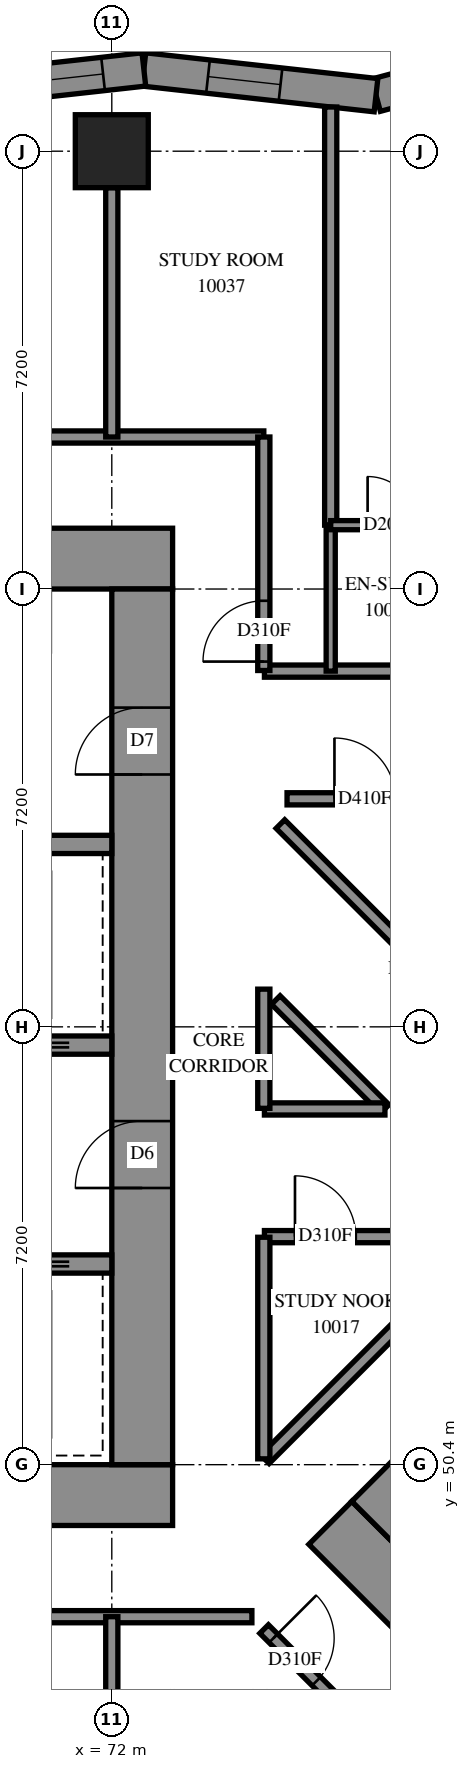
"""IFC4 building model, lengths in metres.
Left out: names, types, materials, properties, quantities, classifications, styles, units other than length and angle.
Written with IfcOpenShell. Run it as: python <this file> out.ifc"""

import sys

from ifc_helpers import new_model, si_unit, direction, frame, frame_2d, origin, origin_2d, place, context, subcontext, project, spatial, polyline, rectangle, outline, extrude, element, fill, save


model = new_model("IFC4")
c1 = context("Model", 3, precision=1e-05, world=origin(), true_north=direction((0.0, 1.0)))
c2 = subcontext(c1, "Body", "Model", "MODEL_VIEW")
j1 = project(units=[si_unit("LENGTHUNIT", "METRE"), si_unit("PLANEANGLEUNIT", "RADIAN")], contexts=[c1])
p1 = place(None, origin())
s1 = spatial("IfcSite", under=j1, at=p1, CompositionType="ELEMENT")
p2 = place(p1, origin())
s2 = spatial("IfcBuilding", under=s1, at=p2, CompositionType="ELEMENT")
p3 = place(p2, frame((0.0, 0.0, 40.6)))
s3 = spatial("IfcBuildingStorey", under=s2, at=p3, CompositionType="ELEMENT", Elevation=40.6)
p4 = place(p3, frame((72.0, 72.0, 0.0), z_axis=(0.0, 0.0, 1.0), x_axis=(1.0, 0.0, 0.0)))
e1 = element("IfcColumn", 1, at=p4, inside=s3, PredefinedType="COLUMN", context=c2, shape_type="SweptSolid", body=[
    extrude(rectangle(XDim=1.2, YDim=1.2, at=origin_2d()), origin(), (0.0, 0.0, 1.0), 3.1),
])
p5 = place(p3, frame((56.6, 49.9, -0.3), z_axis=(0.0, 0.0, 1.0), x_axis=(1.0, 0.0, 0.0)))
e2 = element("IfcWall", 2, at=p5, inside=s3, PredefinedType="SHEAR", context=c2, shape_type="SweptSolid", body=[
    extrude(rectangle(XDim=16.4, YDim=1.0, at=frame_2d((8.2, 0.0))), origin(), (0.0, 0.0, 1.0), 2.7),
])
p6 = place(p3, frame((56.6, 65.3, -0.3), z_axis=(0.0, 0.0, 1.0), x_axis=(1.0, 0.0, 0.0)))
e3 = element("IfcWall", 3, at=p6, inside=s3, PredefinedType="SHEAR", context=c2, shape_type="SweptSolid", body=[
    extrude(rectangle(XDim=16.4, YDim=1.0, at=frame_2d((8.2, 0.0))), origin(), (0.0, 0.0, 1.0), 2.7),
])
p7 = place(p6, frame((11.0, 0.0, 0.3)))
e4 = element("IfcOpeningElement", 4, at=p7, cuts=e3, PredefinedType="OPENING", context=c2, shape_type="SweptSolid", body=[
    extrude(rectangle(XDim=0.8, YDim=2.1, at=frame_2d((0.4, 1.05))), frame((0.0, 0.51, 0.0), z_axis=(0.0, -1.0, 0.0), x_axis=(1.0, 0.0, 0.0)), (0.0, 0.0, 1.0), 1.02),
])
p8 = place(p3, frame((72.5, 50.4, -0.3), z_axis=(0.0, 0.0, 1.0), x_axis=(0.0, 1.0, 0.0)))
e5 = element("IfcWall", 5, at=p8, inside=s3, PredefinedType="SHEAR", context=c2, shape_type="SweptSolid", body=[
    extrude(rectangle(XDim=14.4, YDim=1.0, at=frame_2d((7.2, 0.0))), origin(), (0.0, 0.0, 1.0), 2.7),
])
p9 = place(p8, frame((4.55, 0.0, 0.3)))
e6 = element("IfcOpeningElement", 6, at=p9, cuts=e5, PredefinedType="OPENING", context=c2, shape_type="SweptSolid", body=[
    extrude(rectangle(XDim=1.1, YDim=2.1, at=frame_2d((0.55, 1.05))), frame((0.0, 0.51, 0.0), z_axis=(0.0, -1.0, 0.0), x_axis=(1.0, 0.0, 0.0)), (0.0, 0.0, 1.0), 1.02),
])
p10 = place(p8, frame((11.35, 0.0, 0.3)))
e7 = element("IfcOpeningElement", 7, at=p10, cuts=e5, PredefinedType="OPENING", context=c2, shape_type="SweptSolid", body=[
    extrude(rectangle(XDim=1.1, YDim=2.1, at=frame_2d((0.55, 1.05))), frame((0.0, 0.51, 0.0), z_axis=(0.0, -1.0, 0.0), x_axis=(1.0, 0.0, 0.0)), (0.0, 0.0, 1.0), 1.02),
])
p11 = place(p3, frame((57.6, 53.7, 0.0), z_axis=(0.0, 0.0, 1.0), x_axis=(1.0, 0.0, 0.0)))
e8 = element("IfcWall", 8, at=p11, inside=s3, PredefinedType="SOLIDWALL", context=c2, shape_type="SweptSolid", body=[
    extrude(rectangle(XDim=14.4, YDim=0.3, at=frame_2d((7.2, 0.0))), origin(), (0.0, 0.0, 1.0), 3.1),
])
p12 = place(p11, frame((1.25, 0.0, 0.0)))
e9 = element("IfcOpeningElement", 9, at=p12, cuts=e8, PredefinedType="OPENING", context=c2, shape_type="SweptSolid", body=[
    extrude(rectangle(XDim=1.1, YDim=2.1, at=frame_2d((0.55, 1.05))), frame((0.0, 0.16, 0.0), z_axis=(0.0, -1.0, 0.0), x_axis=(1.0, 0.0, 0.0)), (0.0, 0.0, 1.0), 0.32),
])
p13 = place(p11, frame((4.85, 0.0, 0.0)))
e10 = element("IfcOpeningElement", 10, at=p13, cuts=e8, PredefinedType="OPENING", context=c2, shape_type="SweptSolid", body=[
    extrude(rectangle(XDim=1.1, YDim=2.1, at=frame_2d((0.55, 1.05))), frame((0.0, 0.16, 0.0), z_axis=(0.0, -1.0, 0.0), x_axis=(1.0, 0.0, 0.0)), (0.0, 0.0, 1.0), 0.32),
])
p14 = place(p11, frame((8.45, 0.0, 0.0)))
e11 = element("IfcOpeningElement", 11, at=p14, cuts=e8, PredefinedType="OPENING", context=c2, shape_type="SweptSolid", body=[
    extrude(rectangle(XDim=1.1, YDim=2.1, at=frame_2d((0.55, 1.05))), frame((0.0, 0.16, 0.0), z_axis=(0.0, -1.0, 0.0), x_axis=(1.0, 0.0, 0.0)), (0.0, 0.0, 1.0), 0.32),
])
p15 = place(p11, frame((12.05, 0.0, 0.0)))
e12 = element("IfcOpeningElement", 12, at=p15, cuts=e8, PredefinedType="OPENING", context=c2, shape_type="SweptSolid", body=[
    extrude(rectangle(XDim=1.1, YDim=2.1, at=frame_2d((0.55, 1.05))), frame((0.0, 0.16, 0.0), z_axis=(0.0, -1.0, 0.0), x_axis=(1.0, 0.0, 0.0)), (0.0, 0.0, 1.0), 0.32),
])
p16 = place(p3, frame((57.6, 57.3, 0.0), z_axis=(0.0, 0.0, 1.0), x_axis=(1.0, 0.0, 0.0)))
e13 = element("IfcWall", 13, at=p16, inside=s3, PredefinedType="SOLIDWALL", context=c2, shape_type="SweptSolid", body=[
    extrude(rectangle(XDim=14.4, YDim=0.3, at=frame_2d((7.2, 0.0))), origin(), (0.0, 0.0, 1.0), 3.1),
])
p17 = place(p16, frame((12.05, 0.0, 0.0)))
e14 = element("IfcOpeningElement", 14, at=p17, cuts=e13, PredefinedType="OPENING", context=c2, shape_type="SweptSolid", body=[
    extrude(rectangle(XDim=1.1, YDim=2.1, at=frame_2d((0.55, 1.05))), frame((0.0, 0.16, 0.0), z_axis=(0.0, -1.0, 0.0), x_axis=(1.0, 0.0, 0.0)), (0.0, 0.0, 1.0), 0.32),
])
p18 = place(p3, frame((64.8, 60.6, 0.0), z_axis=(0.0, 0.0, 1.0), x_axis=(1.0, 0.0, 0.0)))
e15 = element("IfcWall", 15, at=p18, inside=s3, PredefinedType="SOLIDWALL", context=c2, shape_type="SweptSolid", body=[
    extrude(rectangle(XDim=7.2, YDim=0.3, at=frame_2d((3.6, 0.0))), origin(), (0.0, 0.0, 1.0), 3.1),
])
p19 = place(p3, frame((75.594, 49.443, -0.3), z_axis=(0.0, 0.0, 1.0), x_axis=(0.7071037324, -0.70710983, 0.0)))
e16 = element("IfcWall", 16, at=p19, inside=s3, PredefinedType="SHEAR", context=c2, shape_type="SweptSolid", body=[
    extrude(rectangle(XDim=16.4, YDim=1.0, at=frame_2d((8.2, 0.0))), origin(), (0.0, 0.0, 1.0), 2.7),
])
p20 = place(p3, frame((76.301, 49.443, -0.3), z_axis=(0.0, 0.0, 1.0), x_axis=(0.7071067812, 0.7071067812, 0.0)))
e17 = element("IfcWall", 17, at=p20, inside=s3, PredefinedType="SHEAR", context=c2, shape_type="SweptSolid", body=[
    extrude(rectangle(XDim=14.4, YDim=1.0, at=frame_2d((7.2, 0.0))), origin(), (0.0, 0.0, 1.0), 2.7),
])
p21 = place(p20, frame((4.55, 0.0, 0.3)))
e18 = element("IfcOpeningElement", 18, at=p21, cuts=e17, PredefinedType="OPENING", context=c2, shape_type="SweptSolid", body=[
    extrude(rectangle(XDim=1.1, YDim=2.1, at=frame_2d((0.55, 1.05))), frame((0.0, 0.51, 0.0), z_axis=(0.0, -1.0, 0.0), x_axis=(1.0, 0.0, 0.0)), (0.0, 0.0, 1.0), 1.02),
])
p22 = place(p20, frame((11.35, 0.0, 0.3)))
e19 = element("IfcOpeningElement", 19, at=p22, cuts=e17, PredefinedType="OPENING", context=c2, shape_type="SweptSolid", body=[
    extrude(rectangle(XDim=1.1, YDim=2.1, at=frame_2d((0.55, 1.05))), frame((0.0, 0.51, 0.0), z_axis=(0.0, -1.0, 0.0), x_axis=(1.0, 0.0, 0.0)), (0.0, 0.0, 1.0), 1.02),
])
p23 = place(p3, frame((79.982, 73.899, 0.0), z_axis=(0.0, 0.0, 1.0), x_axis=(-0.9656880232, -0.259704913, 0.0)))
e20 = element("IfcWall", 20, at=p23, inside=s3, PredefinedType="SOLIDWALL", context=c2, shape_type="SweptSolid", body=[
    extrude(outline(polyline([(-0.217, -0.275), (3.714, -0.275), (3.818, 0.275), (0.217, 0.275), (-0.217, -0.275)])), origin(), (0.0, 0.0, 1.0), 3.1),
])
p24 = place(p23, frame((1.588, 0.0, 0.5)))
e21 = element("IfcOpeningElement", 21, at=p24, cuts=e20, PredefinedType="OPENING", context=c2, shape_type="SweptSolid", body=[
    extrude(rectangle(XDim=1.2, YDim=2.45, at=frame_2d((0.6, 1.225))), frame((0.0, 0.285, 0.0), z_axis=(0.0, -1.0, 0.0), x_axis=(1.0, 0.0, 0.0)), (0.0, 0.0, 1.0), 0.57),
])
p25 = place(p3, frame((76.345, 72.921, 0.0), z_axis=(0.0, 0.0, 1.0), x_axis=(-0.9939087915, 0.1102057815, 0.0)))
e22 = element("IfcWall", 22, at=p25, inside=s3, PredefinedType="SOLIDWALL", context=c2, shape_type="SweptSolid", body=[
    extrude(outline(polyline([(0.052, -0.275), (3.872, -0.275), (3.811, 0.275), (-0.052, 0.275), (0.052, -0.275)])), origin(), (0.0, 0.0, 1.0), 3.1),
])
p26 = place(p25, frame((1.58, 0.0, 0.5)))
e23 = element("IfcOpeningElement", 23, at=p26, cuts=e22, PredefinedType="OPENING", context=c2, shape_type="SweptSolid", body=[
    extrude(rectangle(XDim=1.2, YDim=2.45, at=frame_2d((0.6, 1.225))), frame((0.0, 0.285, 0.0), z_axis=(0.0, -1.0, 0.0), x_axis=(1.0, 0.0, 0.0)), (0.0, 0.0, 1.0), 0.57),
])
p27 = place(p3, frame((72.527, 73.344, 0.0), z_axis=(0.0, 0.0, 1.0), x_axis=(-0.99390702, -0.1102217568, 0.0)))
e24 = element("IfcWall", 24, at=p27, inside=s3, PredefinedType="SOLIDWALL", context=c2, shape_type="SweptSolid", body=[
    extrude(outline(polyline([(-0.03, -0.275), (3.789, -0.275), (3.85, 0.275), (0.03, 0.275), (-0.03, -0.275)])), origin(), (0.0, 0.0, 1.0), 3.1),
])
p28 = place(p27, frame((0.675, 0.0, 0.5)))
e25 = element("IfcOpeningElement", 25, at=p28, cuts=e24, PredefinedType="OPENING", context=c2, shape_type="SweptSolid", body=[
    extrude(rectangle(XDim=2.8, YDim=2.45, at=frame_2d((1.4, 1.225))), frame((0.0, 0.285, 0.0), z_axis=(0.0, -1.0, 0.0), x_axis=(1.0, 0.0, 0.0)), (0.0, 0.0, 1.0), 0.57),
])
p29 = place(p3, frame((55.1, 67.3, 0.0), z_axis=(0.0, 0.0, 1.0), x_axis=(1.0, 0.0, 0.0)))
e26 = element("IfcWall", 26, at=p29, inside=s3, PredefinedType="PARTITIONING", context=c2, shape_type="SweptSolid", body=[
    extrude(rectangle(XDim=19.4, YDim=0.2, at=frame_2d((9.7, 0.0))), origin(), (0.0, 0.0, 1.0), 3.1),
])
p30 = place(p29, frame((6.399, 0.0, 0.0)))
e27 = element("IfcOpeningElement", 27, at=p30, cuts=e26, PredefinedType="OPENING", context=c2, shape_type="SweptSolid", body=[
    extrude(rectangle(XDim=0.9, YDim=2.1, at=frame_2d((0.45, 1.05))), frame((0.0, 0.11, 0.0), z_axis=(0.0, -1.0, 0.0), x_axis=(1.0, 0.0, 0.0)), (0.0, 0.0, 1.0), 0.22),
])
p31 = place(p29, frame((13.599, 0.0, 0.0)))
e28 = element("IfcOpeningElement", 28, at=p31, cuts=e26, PredefinedType="OPENING", context=c2, shape_type="SweptSolid", body=[
    extrude(rectangle(XDim=0.9, YDim=2.1, at=frame_2d((0.45, 1.05))), frame((0.0, 0.11, 0.0), z_axis=(0.0, -1.0, 0.0), x_axis=(1.0, 0.0, 0.0)), (0.0, 0.0, 1.0), 0.22),
])
p32 = place(p3, frame((55.1, 47.9, 0.0), z_axis=(0.0, 0.0, 1.0), x_axis=(1.0, 0.0, 0.0)))
e29 = element("IfcWall", 29, at=p32, inside=s3, PredefinedType="PARTITIONING", context=c2, shape_type="SweptSolid", body=[
    extrude(rectangle(XDim=19.204, YDim=0.2, at=frame_2d((9.602, 0.0))), origin(), (0.0, 0.0, 1.0), 3.1),
])
p33 = place(p32, frame((6.399, 0.0, 0.0)))
e30 = element("IfcOpeningElement", 30, at=p33, cuts=e29, PredefinedType="OPENING", context=c2, shape_type="SweptSolid", body=[
    extrude(rectangle(XDim=0.9, YDim=2.1, at=frame_2d((0.45, 1.05))), frame((0.0, 0.11, 0.0), z_axis=(0.0, -1.0, 0.0), x_axis=(1.0, 0.0, 0.0)), (0.0, 0.0, 1.0), 0.22),
])
p34 = place(p32, frame((13.599, 0.0, 0.0)))
e31 = element("IfcOpeningElement", 31, at=p34, cuts=e29, PredefinedType="OPENING", context=c2, shape_type="SweptSolid", body=[
    extrude(rectangle(XDim=0.9, YDim=2.1, at=frame_2d((0.45, 1.05))), frame((0.0, 0.11, 0.0), z_axis=(0.0, -1.0, 0.0), x_axis=(1.0, 0.0, 0.0)), (0.0, 0.0, 1.0), 0.22),
])
p35 = place(p3, frame((75.6, 65.85, 0.0), z_axis=(0.0, 0.0, 1.0), x_axis=(0.0, 1.0, 0.0)))
e32 = element("IfcWall", 32, at=p35, inside=s3, PredefinedType="PARTITIONING", context=c2, shape_type="SweptSolid", body=[
    extrude(rectangle(XDim=6.877, YDim=0.2, at=frame_2d((3.438, 0.0))), origin(), (0.0, 0.0, 1.0), 3.1),
])
p36 = place(p3, frame((74.773, 60.935, 0.0), z_axis=(0.0, 0.0, 1.0), x_axis=(0.7071067812, -0.7071067812, 0.0)))
e33 = element("IfcWall", 33, at=p36, inside=s3, PredefinedType="PARTITIONING", context=c2, shape_type="SweptSolid", body=[
    extrude(rectangle(XDim=5.408, YDim=0.2, at=frame_2d((2.704, 0.0))), origin(), (0.0, 0.0, 1.0), 3.1),
])
p37 = place(p3, frame((74.517, 50.489, 0.0), z_axis=(0.0, 0.0, 1.0), x_axis=(0.7071067812, 0.7071067812, 0.0)))
e34 = element("IfcWall", 34, at=p37, inside=s3, PredefinedType="PARTITIONING", context=c2, shape_type="SweptSolid", body=[
    extrude(rectangle(XDim=5.176, YDim=0.2, at=frame_2d((2.588, 0.0))), origin(), (0.0, 0.0, 1.0), 3.1),
])
p38 = place(p3, frame((74.51, 63.45, 0.0), z_axis=(0.0, 0.0, 1.0), x_axis=(1.0, 0.0, 0.0)))
e35 = element("IfcWall", 35, at=p38, inside=s3, PredefinedType="PARTITIONING", context=c2, shape_type="SweptSolid", body=[
    extrude(rectangle(XDim=4.69, YDim=0.2, at=frame_2d((2.345, 0.0))), origin(), (0.0, 0.0, 1.0), 3.1),
])
p39 = place(p38, frame((3.12, 0.0, 0.0)))
e36 = element("IfcOpeningElement", 36, at=p39, cuts=e35, PredefinedType="OPENING", context=c2, shape_type="SweptSolid", body=[
    extrude(rectangle(XDim=0.9, YDim=2.1, at=frame_2d((0.45, 1.05))), frame((0.0, 0.11, 0.0), z_axis=(0.0, -1.0, 0.0), x_axis=(1.0, 0.0, 0.0)), (0.0, 0.0, 1.0), 0.22),
])
p40 = place(p3, frame((74.882, 61.35, 0.0), z_axis=(0.0, 0.0, 1.0), x_axis=(1.0, 0.0, 0.0)))
e37 = element("IfcWall", 37, at=p40, inside=s3, PredefinedType="PARTITIONING", context=c2, shape_type="SweptSolid", body=[
    extrude(rectangle(XDim=4.318, YDim=0.2, at=frame_2d((2.159, 0.0))), origin(), (0.0, 0.0, 1.0), 3.1),
])
p41 = place(p40, frame((0.78, 0.0, 0.0)))
e38 = element("IfcOpeningElement", 38, at=p41, cuts=e37, PredefinedType="OPENING", context=c2, shape_type="SweptSolid", body=[
    extrude(rectangle(XDim=1.0, YDim=2.1, at=frame_2d((0.5, 1.05))), frame((0.0, 0.11, 0.0), z_axis=(0.0, -1.0, 0.0), x_axis=(1.0, 0.0, 0.0)), (0.0, 0.0, 1.0), 0.22),
])
for number, where, z_axis, x_axis in (
    (39, (72.0, 67.3, 0.0), (0.0, 0.0, 1.0), (0.0, 1.0, 0.0)),
    (40, (72.0, 43.8, 0.0), (0.0, 0.0, 1.0), (0.0, 1.0, 0.0)),
):
    element("IfcWall", number, at=place(p3, frame(where, z_axis=z_axis, x_axis=x_axis)), inside=s3, PredefinedType="PARTITIONING", context=c2, shape_type="SweptSolid", body=[
        extrude(rectangle(XDim=4.1, YDim=0.2, at=frame_2d((2.05, 0.0))), origin(), (0.0, 0.0, 1.0), 3.1),
    ])
p42 = place(p3, frame((74.505, 47.697, 0.0), z_axis=(0.0, 0.0, 1.0), x_axis=(0.7071067812, -0.7071067812, 0.0)))
e41 = element("IfcWall", 41, at=p42, inside=s3, PredefinedType="PARTITIONING", context=c2, shape_type="SweptSolid", body=[
    extrude(rectangle(XDim=4.019, YDim=0.2, at=frame_2d((2.01, 0.0))), origin(), (0.0, 0.0, 1.0), 3.1),
])
p43 = place(p42, frame((0.215, 0.0, 0.0)))
e42 = element("IfcOpeningElement", 42, at=p43, cuts=e41, PredefinedType="OPENING", context=c2, shape_type="SweptSolid", body=[
    extrude(rectangle(XDim=1.0, YDim=2.1, at=frame_2d((0.5, 1.05))), frame((0.0, 0.11, 0.0), z_axis=(0.0, -1.0, 0.0), x_axis=(1.0, 0.0, 0.0)), (0.0, 0.0, 1.0), 0.22),
])
p44 = place(p3, frame((74.5, 63.46, 0.0), z_axis=(0.0, 0.0, 1.0), x_axis=(0.0, 1.0, 0.0)))
e43 = element("IfcWall", 43, at=p44, inside=s3, PredefinedType="PARTITIONING", context=c2, shape_type="SweptSolid", body=[
    extrude(rectangle(XDim=3.84, YDim=0.2, at=frame_2d((1.92, 0.0))), origin(), (0.0, 0.0, 1.0), 3.1),
])
p45 = place(p44, frame((0.147, 0.0, 0.0)))
e44 = element("IfcOpeningElement", 44, at=p45, cuts=e43, PredefinedType="OPENING", context=c2, shape_type="SweptSolid", body=[
    extrude(rectangle(XDim=1.0, YDim=2.1, at=frame_2d((0.5, 1.05))), frame((0.0, 0.11, 0.0), z_axis=(0.0, -1.0, 0.0), x_axis=(1.0, 0.0, 0.0)), (0.0, 0.0, 1.0), 0.22),
])
p46 = place(p3, frame((74.51, 54.15, 0.0), z_axis=(0.0, 0.0, 1.0), x_axis=(1.0, 0.0, 0.0)))
e45 = element("IfcWall", 45, at=p46, inside=s3, PredefinedType="PARTITIONING", context=c2, shape_type="SweptSolid", body=[
    extrude(rectangle(XDim=3.666, YDim=0.2, at=frame_2d((1.833, 0.0))), origin(), (0.0, 0.0, 1.0), 3.1),
])
p47 = place(p46, frame((0.502, 0.0, 0.0)))
e46 = element("IfcOpeningElement", 46, at=p47, cuts=e45, PredefinedType="OPENING", context=c2, shape_type="SweptSolid", body=[
    extrude(rectangle(XDim=1.0, YDim=2.1, at=frame_2d((0.5, 1.05))), frame((0.0, 0.11, 0.0), z_axis=(0.0, -1.0, 0.0), x_axis=(1.0, 0.0, 0.0)), (0.0, 0.0, 1.0), 0.22),
])
p48 = place(p3, frame((74.5, 50.496, 0.0), z_axis=(0.0, 0.0, 1.0), x_axis=(0.0, 1.0, 0.0)))
e47 = element("IfcWall", 47, at=p48, inside=s3, PredefinedType="PARTITIONING", context=c2, shape_type="SweptSolid", body=[
    extrude(rectangle(XDim=3.644, YDim=0.2, at=frame_2d((1.822, 0.0))), origin(), (0.0, 0.0, 1.0), 3.1),
])
p49 = place(p3, frame((74.697, 58.041, 0.0), z_axis=(0.0, 0.0, 1.0), x_axis=(0.7071067812, -0.7071067812, 0.0)))
e48 = element("IfcWall", 48, at=p49, inside=s3, PredefinedType="PARTITIONING", context=c2, shape_type="SweptSolid", body=[
    extrude(rectangle(XDim=2.534, YDim=0.2, at=frame_2d((1.267, 0.0))), origin(), (0.0, 0.0, 1.0), 3.1),
])
p50 = place(p3, frame((75.6, 63.45, 0.0), z_axis=(0.0, 0.0, 1.0), x_axis=(0.0, 1.0, 0.0)))
e49 = element("IfcWall", 49, at=p50, inside=s3, PredefinedType="PARTITIONING", context=c2, shape_type="SweptSolid", body=[
    extrude(rectangle(XDim=2.4, YDim=0.15, at=frame_2d((1.2, 0.0))), origin(), (0.0, 0.0, 1.0), 3.1),
])
p51 = place(p3, frame((74.51, 56.25, 0.0), z_axis=(0.0, 0.0, 1.0), x_axis=(1.0, 0.0, 0.0)))
e50 = element("IfcWall", 50, at=p51, inside=s3, PredefinedType="PARTITIONING", context=c2, shape_type="SweptSolid", body=[
    extrude(rectangle(XDim=1.982, YDim=0.2, at=frame_2d((0.991, 0.0))), origin(), (0.0, 0.0, 1.0), 3.1),
])
p52 = place(p3, frame((74.5, 56.26, 0.0), z_axis=(0.0, 0.0, 1.0), x_axis=(0.0, 1.0, 0.0)))
e51 = element("IfcWall", 51, at=p52, inside=s3, PredefinedType="PARTITIONING", context=c2, shape_type="SweptSolid", body=[
    extrude(rectangle(XDim=1.96, YDim=0.2, at=frame_2d((0.98, 0.0))), origin(), (0.0, 0.0, 1.0), 3.1),
])
p53 = place(p3, frame((75.6, 65.85, 0.0), z_axis=(0.0, 0.0, 1.0), x_axis=(1.0, 0.0, 0.0)))
e52 = element("IfcWall", 52, at=p53, inside=s3, PredefinedType="PARTITIONING", context=c2, shape_type="SweptSolid", body=[
    extrude(rectangle(XDim=1.9, YDim=0.15, at=frame_2d((0.95, 0.0))), origin(), (0.0, 0.0, 1.0), 3.1),
])
p54 = place(p53, frame((0.607, 0.0, 0.0)))
e53 = element("IfcOpeningElement", 53, at=p54, cuts=e52, PredefinedType="OPENING", context=c2, shape_type="SweptSolid", body=[
    extrude(rectangle(XDim=0.8, YDim=2.1, at=frame_2d((0.4, 1.05))), frame((0.0, 0.085, 0.0), z_axis=(0.0, -1.0, 0.0), x_axis=(1.0, 0.0, 0.0)), (0.0, 0.0, 1.0), 0.17),
])
p55 = place(p26, origin())
e54 = element("IfcWindow", 54, at=p55, inside=s3, PartitioningType="SINGLE_PANEL", PredefinedType="WINDOW", context=c2, shape_type="SweptSolid", body=[
    extrude(rectangle(XDim=1.2, YDim=2.45, at=frame_2d((0.6, 1.225))), frame((0.0, 0.155, 0.0), z_axis=(0.0, -1.0, 0.0), x_axis=(1.0, 0.0, 0.0)), (0.0, 0.0, 1.0), 0.06),
])
fill(e23, e54)
p56 = place(p28, origin())
e55 = element("IfcWindow", 55, at=p56, inside=s3, PartitioningType="SINGLE_PANEL", PredefinedType="WINDOW", context=c2, shape_type="SweptSolid", body=[
    extrude(rectangle(XDim=2.8, YDim=2.45, at=frame_2d((1.4, 1.225))), frame((0.0, 0.155, 0.0), z_axis=(0.0, -1.0, 0.0), x_axis=(1.0, 0.0, 0.0)), (0.0, 0.0, 1.0), 0.06),
])
fill(e25, e55)
p57 = place(p9, origin())
e56 = element("IfcDoor", 56, at=p57, inside=s3, OperationType="DOUBLE_DOOR_SINGLE_SWING", PredefinedType="DOOR", context=c2, shape_type="SweptSolid", body=[
    extrude(rectangle(XDim=1.1, YDim=2.1, at=frame_2d((0.55, 1.05))), frame((0.0, 0.025, 0.0), z_axis=(0.0, -1.0, 0.0), x_axis=(1.0, 0.0, 0.0)), (0.0, 0.0, 1.0), 0.05),
])
fill(e6, e56)
p58 = place(p10, origin())
e57 = element("IfcDoor", 57, at=p58, inside=s3, OperationType="SINGLE_SWING_RIGHT", PredefinedType="DOOR", context=c2, shape_type="SweptSolid", body=[
    extrude(rectangle(XDim=1.1, YDim=2.1, at=frame_2d((0.55, 1.05))), frame((0.0, 0.025, 0.0), z_axis=(0.0, -1.0, 0.0), x_axis=(1.0, 0.0, 0.0)), (0.0, 0.0, 1.0), 0.05),
])
fill(e7, e57)
p59 = place(p47, origin())
e58 = element("IfcDoor", 58, at=p59, inside=s3, OperationType="SINGLE_SWING_RIGHT", PredefinedType="DOOR", context=c2, shape_type="SweptSolid", body=[
    extrude(rectangle(XDim=1.0, YDim=2.1, at=frame_2d((0.5, 1.05))), frame((0.0, 0.025, 0.0), z_axis=(0.0, -1.0, 0.0), x_axis=(1.0, 0.0, 0.0)), (0.0, 0.0, 1.0), 0.05),
])
fill(e46, e58)
p60 = place(p45, origin())
e59 = element("IfcDoor", 59, at=p60, inside=s3, OperationType="SINGLE_SWING_RIGHT", PredefinedType="DOOR", context=c2, shape_type="SweptSolid", body=[
    extrude(rectangle(XDim=1.0, YDim=2.1, at=frame_2d((0.5, 1.05))), frame((0.0, 0.025, 0.0), z_axis=(0.0, -1.0, 0.0), x_axis=(1.0, 0.0, 0.0)), (0.0, 0.0, 1.0), 0.05),
])
fill(e44, e59)
p61 = place(p54, origin())
e60 = element("IfcDoor", 60, at=p61, inside=s3, OperationType="SINGLE_SWING_RIGHT", PredefinedType="DOOR", context=c2, shape_type="SweptSolid", body=[
    extrude(rectangle(XDim=0.8, YDim=2.1, at=frame_2d((0.4, 1.05))), frame((0.0, 0.025, 0.0), z_axis=(0.0, -1.0, 0.0), x_axis=(1.0, 0.0, 0.0)), (0.0, 0.0, 1.0), 0.05),
])
fill(e53, e60)
p62 = place(p43, origin())
e61 = element("IfcDoor", 61, at=p62, inside=s3, OperationType="SINGLE_SWING_LEFT", PredefinedType="DOOR", context=c2, shape_type="SweptSolid", body=[
    extrude(rectangle(XDim=1.0, YDim=2.1, at=frame_2d((0.5, 1.05))), frame((0.0, 0.025, 0.0), z_axis=(0.0, -1.0, 0.0), x_axis=(1.0, 0.0, 0.0)), (0.0, 0.0, 1.0), 0.05),
])
fill(e42, e61)
p63 = place(p41, origin())
e62 = element("IfcDoor", 62, at=p63, inside=s3, OperationType="SINGLE_SWING_RIGHT", PredefinedType="DOOR", context=c2, shape_type="SweptSolid", body=[
    extrude(rectangle(XDim=1.0, YDim=2.1, at=frame_2d((0.5, 1.05))), frame((0.0, 0.025, 0.0), z_axis=(0.0, -1.0, 0.0), x_axis=(1.0, 0.0, 0.0)), (0.0, 0.0, 1.0), 0.05),
])
fill(e38, e62)
save(model, sys.argv[1])
